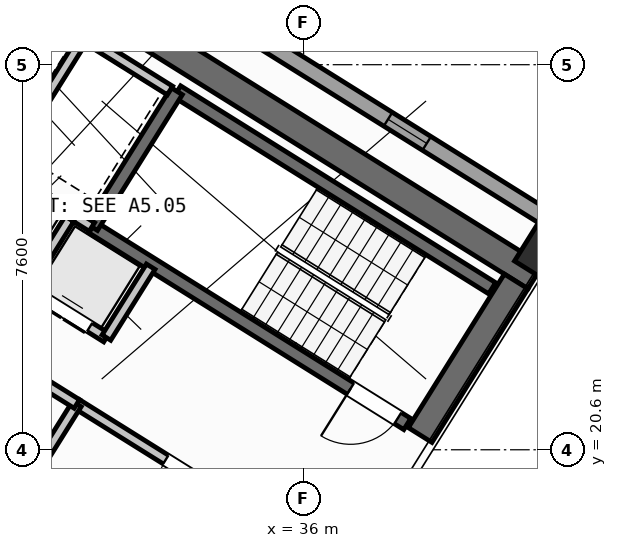
"""IFC4 building model, lengths in metres.
Left out: names, types, materials, properties, quantities, classifications, styles, units other than length and angle.
Written with IfcOpenShell. Run it as: python <this file> out.ifc"""

import sys

from ifc_helpers import new_model, si_unit, direction, frame, frame_2d, origin, origin_2d, place, context, subcontext, project, spatial, rectangle, hollow_rectangle, extrude, source, transform, mapped, element, fill, save


model = new_model("IFC4")
c1 = context("Model", 3, precision=1e-05, world=origin(), true_north=direction((0.0, 1.0)))
c2 = subcontext(c1, "Body", "Model", "MODEL_VIEW")
j1 = project(units=[si_unit("LENGTHUNIT", "METRE"), si_unit("PLANEANGLEUNIT", "RADIAN")], contexts=[c1])
p1 = place(None, origin())
s1 = spatial("IfcSite", under=j1, at=p1, CompositionType="ELEMENT")
p2 = place(p1, origin())
s2 = spatial("IfcBuilding", under=s1, at=p2, CompositionType="ELEMENT")
p3 = place(p2, frame((0.0, 0.0, 147.9)))
s3 = spatial("IfcBuildingStorey", under=s2, at=p3, CompositionType="ELEMENT", Elevation=147.9)
p4 = place(p3, frame((40.573, 24.01, 0.0), z_axis=(0.0, 0.0, 1.0), x_axis=(-0.848047359947, 0.529920442413, 0.0)))
e1 = element("IfcWall", 1, at=p4, inside=s3, PredefinedType="SHEAR", context=c2, shape_type="SweptSolid", body=[
    extrude(rectangle(XDim=13.14, YDim=0.55, at=frame_2d((6.57, 0.0))), origin(), (0.0, 0.0, 1.0), 3.35),
])
p5 = place(p3, frame((40.194, 23.922, 0.0), z_axis=(0.0, 0.0, 1.0), x_axis=(-0.529888438328, -0.848067357541, 0.0)))
e2 = element("IfcWall", 2, at=p5, inside=s3, PredefinedType="SHEAR", context=c2, shape_type="SweptSolid", body=[
    extrude(rectangle(XDim=3.575, YDim=0.55, at=frame_2d((1.788, 0.0))), origin(), (0.0, 0.0, 1.0), 3.35),
])
m1 = source(origin(), c2, "Body", "SweptSolid", [
    extrude(hollow_rectangle(XDim=0.9, YDim=0.9, WallThickness=0.036, at=origin_2d()), origin(), (0.0, 0.0, 1.0), 3.6),
])
p6 = place(p3, frame((40.783, 24.469, 0.0), z_axis=(0.0, 0.0, 1.0), x_axis=(-0.848048096156, 0.529919264233, 0.0)))
e3 = element("IfcColumn", 3, at=p6, inside=s3, PredefinedType="COLUMN", context=c2, shape_type="MappedRepresentation", body=[
    mapped(m1, transform((0.0, 0.0, 0.0), scale=1.0)),
])
p7 = place(p3, frame((14.138, 41.825, 0.0), z_axis=(0.0, 0.0, 1.0), x_axis=(0.848046498049, -0.529921821731, 0.0)))
e4 = element("IfcWall", 4, at=p7, inside=s3, PredefinedType="STANDARD", context=c2, shape_type="SweptSolid", body=[
    extrude(rectangle(XDim=31.588, YDim=0.32, at=frame_2d((15.794, 0.0))), origin(), (0.0, 0.0, 1.0), 3.35),
])
p8 = place(p7, frame((2.949, 0.0, 0.0)))
e5 = element("IfcOpeningElement", 5, at=p8, cuts=e4, PredefinedType="OPENING", context=c2, shape_type="SweptSolid", body=[
    extrude(rectangle(XDim=1.05, YDim=2.15, at=frame_2d((0.525, 1.075))), frame((0.0, 0.17, 0.0), z_axis=(0.0, -1.0, 0.0), x_axis=(1.0, 0.0, 0.0)), (0.0, 0.0, 1.0), 0.34),
])
p9 = place(p7, frame((0.861, 0.0, 0.85)))
e6 = element("IfcOpeningElement", 6, at=p9, cuts=e4, PredefinedType="OPENING", context=c2, shape_type="SweptSolid", body=[
    extrude(rectangle(XDim=1.5, YDim=1.5, at=frame_2d((0.75, 0.75))), frame((0.0, 0.17, 0.0), z_axis=(0.0, -1.0, 0.0), x_axis=(1.0, 0.0, 0.0)), (0.0, 0.0, 1.0), 0.34),
])
p10 = place(p7, frame((8.494, 0.0, 0.85)))
e7 = element("IfcOpeningElement", 7, at=p10, cuts=e4, PredefinedType="OPENING", context=c2, shape_type="SweptSolid", body=[
    extrude(rectangle(XDim=1.8, YDim=1.5, at=frame_2d((0.9, 0.75))), frame((0.0, 0.17, 0.0), z_axis=(0.0, -1.0, 0.0), x_axis=(1.0, 0.0, 0.0)), (0.0, 0.0, 1.0), 0.34),
])
p11 = place(p7, frame((13.874, 0.0, 0.85)))
e8 = element("IfcOpeningElement", 8, at=p11, cuts=e4, PredefinedType="OPENING", context=c2, shape_type="SweptSolid", body=[
    extrude(rectangle(XDim=1.5, YDim=1.5, at=frame_2d((0.75, 0.75))), frame((0.0, 0.17, 0.0), z_axis=(0.0, -1.0, 0.0), x_axis=(1.0, 0.0, 0.0)), (0.0, 0.0, 1.0), 0.34),
])
p12 = place(p7, frame((17.104, 0.0, 1.0)))
e9 = element("IfcOpeningElement", 9, at=p12, cuts=e4, PredefinedType="OPENING", context=c2, shape_type="SweptSolid", body=[
    extrude(rectangle(XDim=0.9, YDim=1.25, at=frame_2d((0.45, 0.625))), frame((0.0, 0.17, 0.0), z_axis=(0.0, -1.0, 0.0), x_axis=(1.0, 0.0, 0.0)), (0.0, 0.0, 1.0), 0.34),
])
p13 = place(p7, frame((22.144, 0.0, 1.0)))
e10 = element("IfcOpeningElement", 10, at=p13, cuts=e4, PredefinedType="OPENING", context=c2, shape_type="SweptSolid", body=[
    extrude(rectangle(XDim=0.9, YDim=1.25, at=frame_2d((0.45, 0.625))), frame((0.0, 0.17, 0.0), z_axis=(0.0, -1.0, 0.0), x_axis=(1.0, 0.0, 0.0)), (0.0, 0.0, 1.0), 0.34),
])
p14 = place(p7, frame((27.744, 0.0, 1.0)))
e11 = element("IfcOpeningElement", 11, at=p14, cuts=e4, PredefinedType="OPENING", context=c2, shape_type="SweptSolid", body=[
    extrude(rectangle(XDim=0.9, YDim=1.25, at=frame_2d((0.45, 0.625))), frame((0.0, 0.17, 0.0), z_axis=(0.0, -1.0, 0.0), x_axis=(1.0, 0.0, 0.0)), (0.0, 0.0, 1.0), 0.34),
])
p15 = place(p3, frame((31.28, 18.261, 0.0), z_axis=(0.0, 0.0, 1.0), x_axis=(-0.848051618787, 0.529913626805, 0.0)))
e12 = element("IfcWall", 12, at=p15, inside=s3, PredefinedType="SHEAR", context=c2, shape_type="SweptSolid", body=[
    extrude(rectangle(XDim=7.46, YDim=0.26, at=frame_2d((3.73, 0.0))), origin(), (0.0, 0.0, 1.0), 3.35),
])
p16 = place(p15, frame((0.36, 0.0, 0.0)))
e13 = element("IfcOpeningElement", 13, at=p16, cuts=e12, PredefinedType="OPENING", context=c2, shape_type="SweptSolid", body=[
    extrude(rectangle(XDim=0.86, YDim=2.05, at=frame_2d((0.43, 1.025))), frame((0.0, 0.14, 0.0), z_axis=(0.0, -1.0, 0.0), x_axis=(1.0, 0.0, 0.0)), (0.0, 0.0, 1.0), 0.28),
])
p17 = place(p3, frame((39.721, 23.788, 0.0), z_axis=(0.0, 0.0, 1.0), x_axis=(-0.848054434086, 0.529909121291, 0.0)))
e14 = element("IfcWall", 14, at=p17, inside=s3, PredefinedType="SHEAR", context=c2, shape_type="SweptSolid", body=[
    extrude(rectangle(XDim=7.33, YDim=0.26, at=frame_2d((3.665, 0.0))), origin(), (0.0, 0.0, 1.0), 3.35),
])
p18 = place(p3, frame((38.046, 21.108, 0.0), z_axis=(0.0, 0.0, 1.0), x_axis=(-0.848054434086, 0.529909121291, 0.0)))
e15 = element("IfcWall", 15, at=p18, inside=s3, PredefinedType="SHEAR", context=c2, shape_type="SweptSolid", body=[
    extrude(rectangle(XDim=7.33, YDim=0.26, at=frame_2d((3.665, 0.0))), origin(), (0.0, 0.0, 1.0), 3.35),
])
p19 = place(p18, frame((0.22, 0.0, 0.0)))
e16 = element("IfcOpeningElement", 16, at=p19, cuts=e15, PredefinedType="OPENING", context=c2, shape_type="SweptSolid", body=[
    extrude(rectangle(XDim=1.1, YDim=2.1, at=frame_2d((0.55, 1.05))), frame((0.0, 0.14, 0.0), z_axis=(0.0, -1.0, 0.0), x_axis=(1.0, 0.0, 0.0)), (0.0, 0.0, 1.0), 0.28),
])
p20 = place(p3, frame((33.496, 27.677, 0.0), z_axis=(0.0, 0.0, 1.0), x_axis=(-0.529908658664, -0.84805472316, 0.0)))
e17 = element("IfcWall", 17, at=p20, inside=s3, PredefinedType="SHEAR", context=c2, shape_type="SweptSolid", body=[
    extrude(rectangle(XDim=3.16, YDim=0.26, at=frame_2d((1.58, 0.0))), origin(), (0.0, 0.0, 1.0), 3.35),
])
p21 = place(p3, frame((36.417, 18.447, 0.0), z_axis=(0.0, 0.0, 1.0), x_axis=(-0.848064879198, 0.529892404805, 0.0)))
e18 = element("IfcWall", 18, at=p21, inside=s3, PredefinedType="STANDARD", context=c2, shape_type="SweptSolid", body=[
    extrude(rectangle(XDim=5.768, YDim=0.2, at=frame_2d((2.884, 0.0))), origin(), (0.0, 0.0, 1.0), 3.34),
])
p22 = place(p21, frame((2.548, 0.0, 0.0)))
e19 = element("IfcOpeningElement", 19, at=p22, cuts=e18, PredefinedType="OPENING", context=c2, shape_type="SweptSolid", body=[
    extrude(rectangle(XDim=1.15, YDim=2.1, at=frame_2d((0.575, 1.05))), frame((0.0, 0.11, 0.0), z_axis=(0.0, -1.0, 0.0), x_axis=(1.0, 0.0, 0.0)), (0.0, 0.0, 1.0), 0.22),
])
p23 = place(p3, frame((31.822, 24.998, 0.0), z_axis=(0.0, 0.0, 1.0), x_axis=(-0.848036912365, 0.52993716162, 0.0)))
e20 = element("IfcWall", 20, at=p23, inside=s3, PredefinedType="STANDARD", context=c2, shape_type="SweptSolid", body=[
    extrude(rectangle(XDim=4.618, YDim=0.2, at=frame_2d((2.309, 0.0))), origin(), (0.0, 0.0, 1.0), 3.34),
])
p24 = place(p3, frame((32.108, 22.814, 0.0), z_axis=(0.0, 0.0, 1.0), x_axis=(-0.848042229521, 0.529928652696, 0.0)))
e21 = element("IfcWall", 21, at=p24, inside=s3, PredefinedType="STANDARD", context=c2, shape_type="SweptSolid", body=[
    extrude(rectangle(XDim=5.62, YDim=0.2, at=frame_2d((2.81, 0.0))), origin(), (0.0, 0.0, 1.0), 3.34),
])
p25 = place(p24, frame((0.39, 0.0, 0.0)))
e22 = element("IfcOpeningElement", 22, at=p25, cuts=e21, PredefinedType="OPENING", context=c2, shape_type="SweptSolid", body=[
    extrude(rectangle(XDim=1.1, YDim=2.15, at=frame_2d((0.55, 1.075))), frame((0.0, 0.11, 0.0), z_axis=(0.0, -1.0, 0.0), x_axis=(1.0, 0.0, 0.0)), (0.0, 0.0, 1.0), 0.22),
])
p26 = place(p24, frame((2.25, 0.0, 0.0)))
e23 = element("IfcOpeningElement", 23, at=p26, cuts=e21, PredefinedType="OPENING", context=c2, shape_type="SweptSolid", body=[
    extrude(rectangle(XDim=1.1, YDim=2.15, at=frame_2d((0.55, 1.075))), frame((0.0, 0.11, 0.0), z_axis=(0.0, -1.0, 0.0), x_axis=(1.0, 0.0, 0.0)), (0.0, 0.0, 1.0), 0.22),
])
p27 = place(p24, frame((4.11, 0.0, 0.0)))
e24 = element("IfcOpeningElement", 24, at=p27, cuts=e21, PredefinedType="OPENING", context=c2, shape_type="SweptSolid", body=[
    extrude(rectangle(XDim=1.1, YDim=2.15, at=frame_2d((0.55, 1.075))), frame((0.0, 0.11, 0.0), z_axis=(0.0, -1.0, 0.0), x_axis=(1.0, 0.0, 0.0)), (0.0, 0.0, 1.0), 0.22),
])
p28 = place(p3, frame((32.982, 24.213, 0.0), z_axis=(0.0, 0.0, 1.0), x_axis=(-0.529839334948, -0.84809803628, 0.0)))
e25 = element("IfcWall", 25, at=p28, inside=s3, PredefinedType="STANDARD", context=c2, shape_type="SweptSolid", body=[
    extrude(rectangle(XDim=1.65, YDim=0.2, at=frame_2d((0.825, 0.0))), origin(), (0.0, 0.0, 1.0), 3.34),
])
p29 = place(p3, frame((31.645, 28.716, 0.0), z_axis=(0.0, 0.0, 1.0), x_axis=(-0.52986693015, -0.848080795876, 0.0)))
e26 = element("IfcWall", 26, at=p29, inside=s3, PredefinedType="STANDARD", context=c2, shape_type="SweptSolid", body=[
    extrude(rectangle(XDim=2.66, YDim=0.2, at=frame_2d((1.33, 0.0))), origin(), (0.0, 0.0, 1.0), 3.34),
])
p30 = place(p3, frame((33.363, 27.69, 0.0), z_axis=(0.0, 0.0, 1.0), x_axis=(-0.848047090064, 0.529920874315, 0.0)))
e27 = element("IfcWall", 27, at=p30, inside=s3, PredefinedType="STANDARD", context=c2, shape_type="SweptSolid", body=[
    extrude(rectangle(XDim=4.498, YDim=0.2, at=frame_2d((2.249, 0.0))), origin(), (0.0, 0.0, 1.0), 3.34),
])
p31 = place(p3, frame((31.379, 25.156, 0.0), z_axis=(0.0, 0.0, 1.0), x_axis=(-0.529998940003, -0.847998304005, 0.0)))
e28 = element("IfcWall", 28, at=p31, inside=s3, PredefinedType="STANDARD", context=c2, shape_type="SweptSolid", body=[
    extrude(rectangle(XDim=1.58, YDim=0.2, at=frame_2d((0.79, 0.0))), origin(), (0.0, 0.0, 1.0), 3.34),
])
p32 = place(p3, frame((31.525, 21.504, 0.0), z_axis=(0.0, 0.0, 1.0), x_axis=(-0.529907497854, -0.848055448493, 0.0)))
e29 = element("IfcWall", 29, at=p32, inside=s3, PredefinedType="STANDARD", context=c2, shape_type="SweptSolid", body=[
    extrude(rectangle(XDim=2.88, YDim=0.2, at=frame_2d((1.44, 0.0))), origin(), (0.0, 0.0, 1.0), 3.34),
])
p33 = place(p3, frame((31.525, 21.504, 0.0), z_axis=(0.0, 0.0, 1.0), x_axis=(-0.848040211232, 0.529931882541, 0.0)))
e30 = element("IfcWall", 30, at=p33, inside=s3, PredefinedType="STANDARD", context=c2, shape_type="SweptSolid", body=[
    extrude(rectangle(XDim=6.218, YDim=0.2, at=frame_2d((3.109, 0.0))), origin(), (0.0, 0.0, 1.0), 3.34),
])
p34 = place(p33, frame((4.4, 0.0, 0.0)))
e31 = element("IfcOpeningElement", 31, at=p34, cuts=e30, PredefinedType="OPENING", context=c2, shape_type="SweptSolid", body=[
    extrude(rectangle(XDim=0.86, YDim=2.05, at=frame_2d((0.43, 1.025))), frame((0.0, 0.11, 0.0), z_axis=(0.0, -1.0, 0.0), x_axis=(1.0, 0.0, 0.0)), (0.0, 0.0, 1.0), 0.22),
])
p35 = place(p33, frame((1.45, 0.0, 0.0)))
e32 = element("IfcOpeningElement", 32, at=p35, cuts=e30, PredefinedType="OPENING", context=c2, shape_type="SweptSolid", body=[
    extrude(rectangle(XDim=0.86, YDim=2.05, at=frame_2d((0.43, 1.025))), frame((0.0, 0.11, 0.0), z_axis=(0.0, -1.0, 0.0), x_axis=(1.0, 0.0, 0.0)), (0.0, 0.0, 1.0), 0.22),
])
m2 = source(origin(), c2, "Body", "SweptSolid", [
    extrude(rectangle(XDim=0.9, YDim=1.25, at=frame_2d((0.45, 0.625))), frame((0.0, 0.03, 0.0), z_axis=(0.0, -1.0, 0.0), x_axis=(1.0, 0.0, 0.0)), (0.0, 0.0, 1.0), 0.06),
])
p36 = place(p14, origin())
e33 = element("IfcWindow", 33, at=p36, inside=s3, PartitioningType="SINGLE_PANEL", PredefinedType="WINDOW", context=c2, shape_type="MappedRepresentation", body=[
    mapped(m2, transform((0.0, 0.0, 0.0), scale=1.0)),
])
fill(e11, e33)
m3 = source(origin(), c2, "Body", "SweptSolid", [
    extrude(rectangle(XDim=1.1, YDim=2.1, at=frame_2d((0.55, 1.05))), frame((0.0, 0.025, 0.0), z_axis=(0.0, -1.0, 0.0), x_axis=(1.0, 0.0, 0.0)), (0.0, 0.0, 1.0), 0.05),
])
p37 = place(p19, origin())
e34 = element("IfcDoor", 34, at=p37, inside=s3, OperationType="SINGLE_SWING_RIGHT", PredefinedType="DOOR", context=c2, shape_type="MappedRepresentation", body=[
    mapped(m3, transform((0.0, 0.0, 0.0), scale=1.0)),
])
fill(e16, e34)
m4 = source(origin(), c2, "Body", "SweptSolid", [
    extrude(rectangle(XDim=1.15, YDim=2.1, at=frame_2d((0.575, 1.05))), frame((0.0, 0.025, 0.0), z_axis=(0.0, -1.0, 0.0), x_axis=(1.0, 0.0, 0.0)), (0.0, 0.0, 1.0), 0.05),
])
p38 = place(p22, origin())
e35 = element("IfcDoor", 35, at=p38, inside=s3, OperationType="SINGLE_SWING_LEFT", PredefinedType="DOOR", context=c2, shape_type="MappedRepresentation", body=[
    mapped(m4, transform((0.0, 0.0, 0.0), scale=1.0)),
])
fill(e19, e35)
m5 = source(origin(), c2, "Body", "SweptSolid", [
    extrude(rectangle(XDim=1.1, YDim=2.15, at=frame_2d((0.55, 1.075))), frame((0.0, 0.025, 0.0), z_axis=(0.0, -1.0, 0.0), x_axis=(1.0, 0.0, 0.0)), (0.0, 0.0, 1.0), 0.05),
])
p39 = place(p25, origin())
e36 = element("IfcDoor", 36, at=p39, inside=s3, OperationType="DOUBLE_DOOR_SLIDING", PredefinedType="DOOR", context=c2, shape_type="MappedRepresentation", body=[
    mapped(m5, transform((0.0, 0.0, 0.0), scale=1.0)),
])
fill(e22, e36)
save(model, sys.argv[1])
